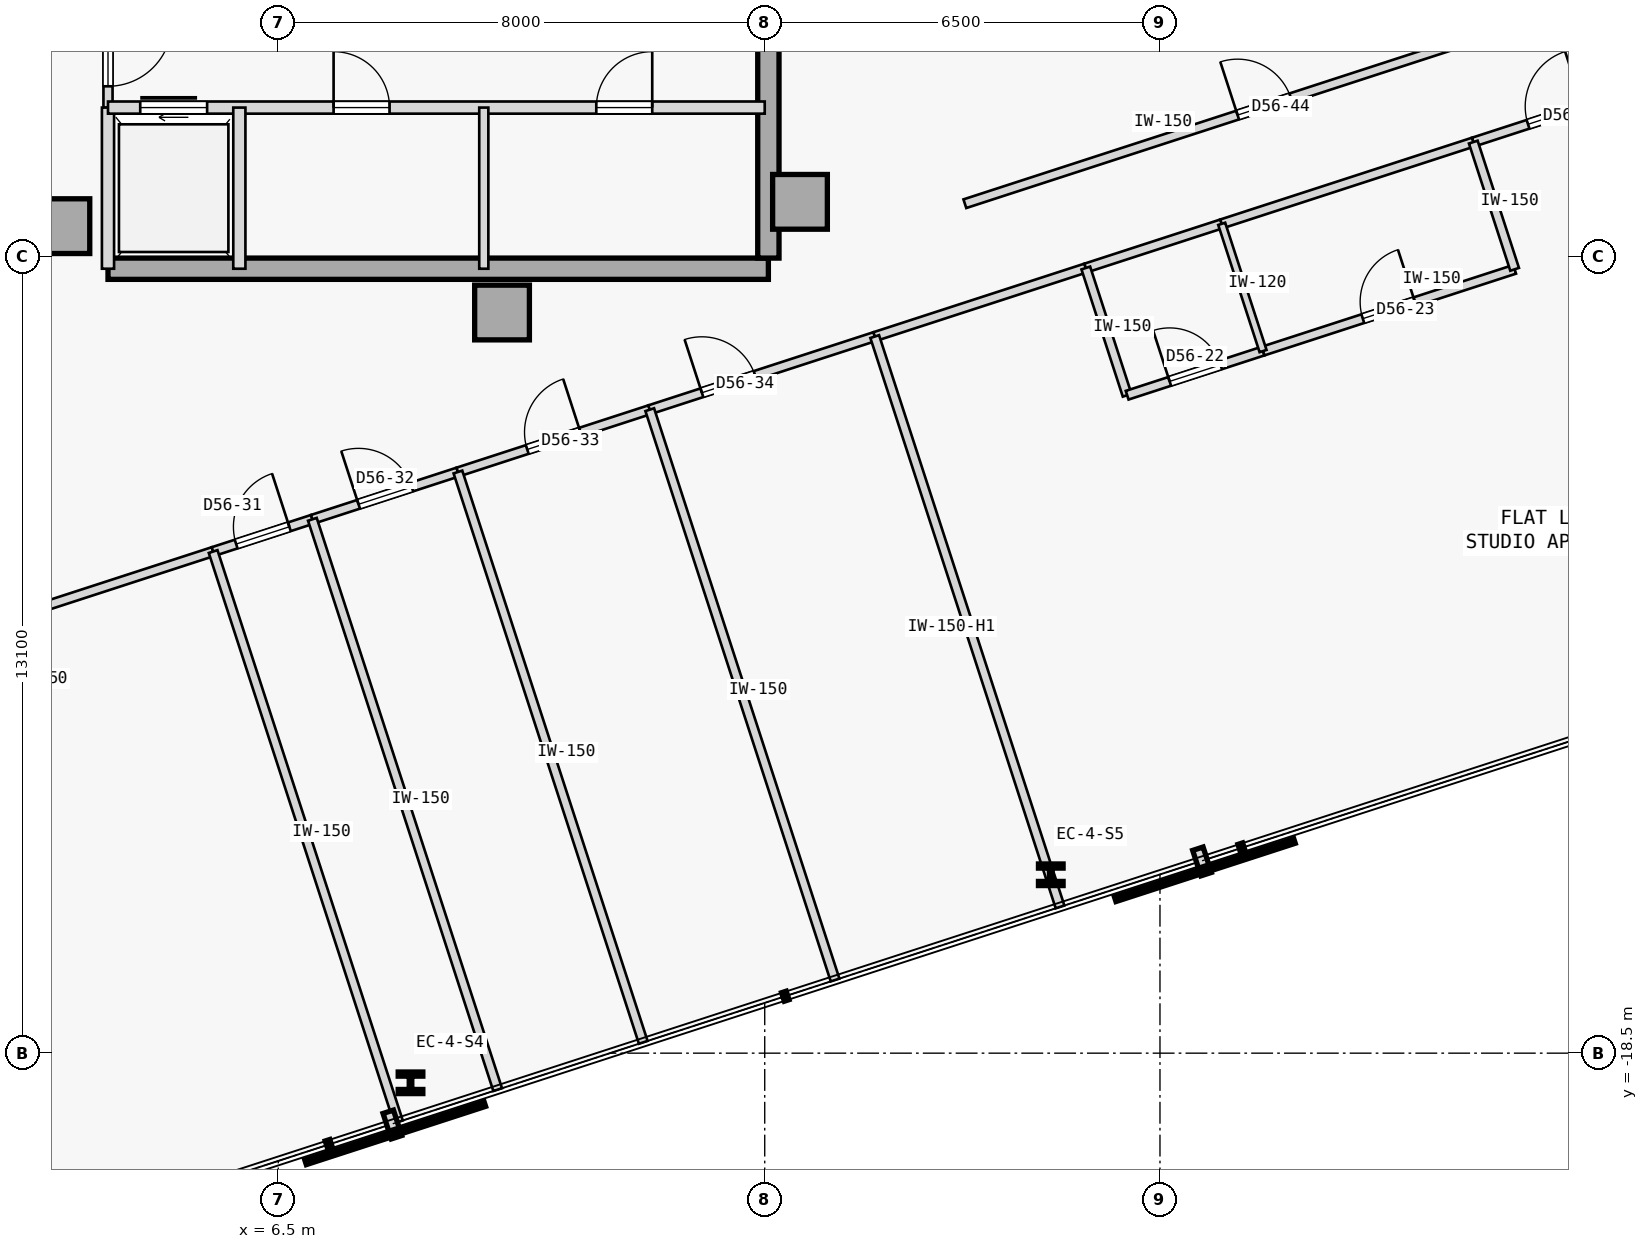
"""IFC4 building model, lengths in metres.
Left out: names, types, materials, properties, quantities, classifications, styles, units other than length and angle.
Written with IfcOpenShell. Run it as: python <this file> out.ifc"""

import sys

from ifc_helpers import new_model, si_unit, direction, frame, frame_2d, origin, origin_2d, place, context, subcontext, project, spatial, rectangle, i_section, extrude, element, fill, save


model = new_model("IFC4")
c1 = context("Model", 3, precision=1e-05, world=origin(), true_north=direction((0.0, 1.0)))
c2 = subcontext(c1, "Body", "Model", "MODEL_VIEW")
j1 = project(units=[si_unit("LENGTHUNIT", "METRE"), si_unit("PLANEANGLEUNIT", "RADIAN")], contexts=[c1])
p1 = place(None, origin())
s1 = spatial("IfcSite", under=j1, at=p1, CompositionType="ELEMENT")
p2 = place(p1, origin())
s2 = spatial("IfcBuilding", under=s1, at=p2, CompositionType="ELEMENT")
p3 = place(p2, frame((0.0, 0.0, 214.25)))
s3 = spatial("IfcBuildingStorey", under=s2, at=p3, CompositionType="ELEMENT", Elevation=214.25)
for number, where, z_axis, x_axis in (
    (1, (15.08, -4.5, 0.0), (0.0, 0.0, 1.0), (1.0, 0.0, 0.0)),
    (2, (10.18, -6.32, 0.0), (0.0, 0.0, 1.0), (1.0, 0.0, 0.0)),
    (3, (2.95, -4.9, 0.0), (0.0, 0.0, 1.0), (1.0, 0.0, 0.0)),
):
    element("IfcColumn", number, at=place(p3, frame(where, z_axis=z_axis, x_axis=x_axis)), inside=s3, PredefinedType="COLUMN", context=c2, shape_type="SweptSolid", body=[
        extrude(rectangle(XDim=0.9, YDim=0.9, at=origin_2d()), origin(), (0.0, 0.0, 1.0), 3.35),
    ])
p4 = place(p3, frame((3.7, -5.6, 0.0), z_axis=(0.0, 0.0, 1.0), x_axis=(1.0, 0.0, 0.0)))
e4 = element("IfcWall", 4, at=p4, inside=s3, PredefinedType="SHEAR", context=c2, shape_type="SweptSolid", body=[
    extrude(rectangle(XDim=10.86, YDim=0.35, at=frame_2d((5.43, 0.0))), origin(), (0.0, 0.0, 1.0), 3.125),
])
p5 = place(p3, frame((14.56, -5.425, 0.0), z_axis=(0.0, 0.0, 1.0), x_axis=(0.0, 1.0, 0.0)))
e5 = element("IfcWall", 5, at=p5, inside=s3, PredefinedType="SHEAR", context=c2, shape_type="SweptSolid", body=[
    extrude(rectangle(XDim=10.85, YDim=0.35, at=frame_2d((5.425, 0.0))), origin(), (0.0, 0.0, 1.0), 3.125),
])
for number, where, z_axis, x_axis in (
    (6, (8.675, -18.988, 0.0), (0.0, 0.0, 1.0), (1.0, 0.0, 0.0)),
    (7, (19.204, -15.566, 0.0), (0.0, 0.0, 1.0), (1.0, 0.0, 0.0)),
):
    element("IfcColumn", number, at=place(p3, frame(where, z_axis=z_axis, x_axis=x_axis)), inside=s3, PredefinedType="COLUMN", context=c2, shape_type="SweptSolid", body=[
        extrude(i_section(OverallWidth=0.405, OverallDepth=0.355, WebThickness=0.042, FlangeThickness=0.068, FilletRadius=0.015, at=origin_2d()), origin(), (0.0, 0.0, 1.0), 3.35),
    ])
p6 = place(p3, frame((3.7, -2.95, 0.0), z_axis=(0.0, 0.0, 1.0), x_axis=(0.0, 1.0, 0.0)))
e8 = element("IfcWall", 8, at=p6, inside=s3, PredefinedType="PARTITIONING", context=c2, shape_type="SweptSolid", body=[
    extrude(rectangle(XDim=1.8, YDim=0.15, at=frame_2d((0.9, 0.0))), origin(), (0.0, 0.0, 1.0), 3.125),
])
p7 = place(p6, frame((0.35, 0.0, 0.0)))
e9 = element("IfcOpeningElement", 9, at=p7, cuts=e8, PredefinedType="OPENING", context=c2, shape_type="SweptSolid", body=[
    extrude(rectangle(XDim=1.05, YDim=2.18, at=frame_2d((0.525, 1.09))), frame((0.0, 0.085, 0.0), z_axis=(0.0, -1.0, 0.0), x_axis=(1.0, 0.0, 0.0)), (0.0, 0.0, 1.0), 0.17),
])
p8 = place(p3, frame((3.7, -5.6, 0.0), z_axis=(0.0, 0.0, 1.0), x_axis=(0.0, 1.0, 0.0)))
e10 = element("IfcWall", 10, at=p8, inside=s3, PredefinedType="STANDARD", context=c2, shape_type="SweptSolid", body=[
    extrude(rectangle(XDim=2.65, YDim=0.2, at=frame_2d((1.325, 0.0))), origin(), (0.0, 0.0, 1.0), 3.125),
])
p9 = place(p3, frame((3.7, -2.95, 0.0), z_axis=(0.0, 0.0, 1.0), x_axis=(1.0, 0.0, 0.0)))
e11 = element("IfcWall", 11, at=p9, inside=s3, PredefinedType="STANDARD", context=c2, shape_type="SweptSolid", body=[
    extrude(rectangle(XDim=10.8, YDim=0.2, at=frame_2d((5.4, 0.0))), origin(), (0.0, 0.0, 1.0), 3.125),
])
p10 = place(p9, frame((0.53, 0.0, 0.0)))
e12 = element("IfcOpeningElement", 12, at=p10, cuts=e11, PredefinedType="OPENING", context=c2, shape_type="SweptSolid", body=[
    extrude(rectangle(XDim=1.1, YDim=2.15, at=frame_2d((0.55, 1.075))), frame((0.0, 0.11, 0.0), z_axis=(0.0, -1.0, 0.0), x_axis=(1.0, 0.0, 0.0)), (0.0, 0.0, 1.0), 0.22),
])
p11 = place(p9, frame((3.71, 0.0, 0.0)))
e13 = element("IfcOpeningElement", 13, at=p11, cuts=e11, PredefinedType="OPENING", context=c2, shape_type="SweptSolid", body=[
    extrude(rectangle(XDim=0.92, YDim=2.15, at=frame_2d((0.46, 1.075))), frame((0.0, 0.11, 0.0), z_axis=(0.0, -1.0, 0.0), x_axis=(1.0, 0.0, 0.0)), (0.0, 0.0, 1.0), 0.22),
])
p12 = place(p9, frame((8.03, 0.0, 0.0)))
e14 = element("IfcOpeningElement", 14, at=p12, cuts=e11, PredefinedType="OPENING", context=c2, shape_type="SweptSolid", body=[
    extrude(rectangle(XDim=0.92, YDim=2.15, at=frame_2d((0.46, 1.075))), frame((0.0, 0.11, 0.0), z_axis=(0.0, -1.0, 0.0), x_axis=(1.0, 0.0, 0.0)), (0.0, 0.0, 1.0), 0.22),
])
p13 = place(p3, frame((5.86, -5.6, 0.0), z_axis=(0.0, 0.0, 1.0), x_axis=(0.0, 1.0, 0.0)))
e15 = element("IfcWall", 15, at=p13, inside=s3, PredefinedType="STANDARD", context=c2, shape_type="SweptSolid", body=[
    extrude(rectangle(XDim=2.65, YDim=0.2, at=frame_2d((1.325, 0.0))), origin(), (0.0, 0.0, 1.0), 3.125),
])
p14 = place(p3, frame((9.88, -5.6, 0.0), z_axis=(0.0, 0.0, 1.0), x_axis=(0.0, 1.0, 0.0)))
e16 = element("IfcWall", 16, at=p14, inside=s3, PredefinedType="PARTITIONING", context=c2, shape_type="SweptSolid", body=[
    extrude(rectangle(XDim=2.65, YDim=0.15, at=frame_2d((1.325, 0.0))), origin(), (0.0, 0.0, 1.0), 3.125),
])
p15 = place(p3, frame((1.98, -11.372, 0.0), z_axis=(0.0, 0.0, 1.0), x_axis=(0.951052868128, 0.309028222052, 0.0)))
e17 = element("IfcWall", 17, at=p15, inside=s3, PredefinedType="PARTITIONING", context=c2, shape_type="SweptSolid", body=[
    extrude(rectangle(XDim=3.626, YDim=0.15, at=frame_2d((1.813, 0.0))), origin(), (0.0, 0.0, 1.0), 3.125),
])
p16 = place(p3, frame((16.309, -6.716, 0.0), z_axis=(0.0, 0.0, 1.0), x_axis=(0.951057168147, 0.309014988174, 0.0)))
e18 = element("IfcWall", 18, at=p16, inside=s3, PredefinedType="PARTITIONING", context=c2, shape_type="SweptSolid", body=[
    extrude(rectangle(XDim=3.65, YDim=0.15, at=frame_2d((1.825, 0.0))), origin(), (0.0, 0.0, 1.0), 3.125),
])
p17 = place(p3, frame((26.152, -3.518, 0.0), z_axis=(0.0, 0.0, 1.0), x_axis=(0.951048201303, 0.309042584119, 0.0)))
e19 = element("IfcWall", 19, at=p17, inside=s3, PredefinedType="PARTITIONING", context=c2, shape_type="SweptSolid", body=[
    extrude(rectangle(XDim=4.062, YDim=0.15, at=frame_2d((2.031, 0.0))), origin(), (0.0, 0.0, 1.0), 3.125),
])
p18 = place(p17, frame((0.947, 0.0, 0.0)))
e20 = element("IfcOpeningElement", 20, at=p18, cuts=e19, PredefinedType="OPENING", context=c2, shape_type="SweptSolid", body=[
    extrude(rectangle(XDim=0.95, YDim=2.15, at=frame_2d((0.475, 1.075))), frame((0.0, 0.085, 0.0), z_axis=(0.0, -1.0, 0.0), x_axis=(1.0, 0.0, 0.0)), (0.0, 0.0, 1.0), 0.17),
])
p19 = place(p3, frame((19.78, -5.588, 0.0), z_axis=(0.0, 0.0, 1.0), x_axis=(0.951076048914, 0.308956872689, 0.0)))
e21 = element("IfcWall", 21, at=p19, inside=s3, PredefinedType="PARTITIONING", context=c2, shape_type="SweptSolid", body=[
    extrude(rectangle(XDim=2.35, YDim=0.15, at=frame_2d((1.175, 0.0))), origin(), (0.0, 0.0, 1.0), 3.125),
])
p20 = place(p3, frame((22.015, -4.862, 0.0), z_axis=(0.0, 0.0, 1.0), x_axis=(0.951052627573, 0.309028962374, 0.0)))
e22 = element("IfcWall", 22, at=p20, inside=s3, PredefinedType="PARTITIONING", context=c2, shape_type="SweptSolid", body=[
    extrude(rectangle(XDim=4.35, YDim=0.15, at=frame_2d((2.175, 0.0))), origin(), (0.0, 0.0, 1.0), 3.125),
])
p21 = place(p3, frame((5.429, -10.251, 0.0), z_axis=(0.0, 0.0, 1.0), x_axis=(0.95104661559, 0.309047463953, 0.0)))
e23 = element("IfcWall", 23, at=p21, inside=s3, PredefinedType="PARTITIONING", context=c2, shape_type="SweptSolid", body=[
    extrude(rectangle(XDim=1.716, YDim=0.15, at=frame_2d((0.858, 0.0))), origin(), (0.0, 0.0, 1.0), 3.125),
])
p22 = place(p21, frame((0.398, 0.0, 0.0)))
e24 = element("IfcOpeningElement", 24, at=p22, cuts=e23, PredefinedType="OPENING", context=c2, shape_type="SweptSolid", body=[
    extrude(rectangle(XDim=0.92, YDim=2.15, at=frame_2d((0.46, 1.075))), frame((0.0, 0.085, 0.0), z_axis=(0.0, -1.0, 0.0), x_axis=(1.0, 0.0, 0.0)), (0.0, 0.0, 1.0), 0.17),
])
p23 = place(p3, frame((7.061, -9.721, 0.0), z_axis=(0.0, 0.0, 1.0), x_axis=(0.951051887333, 0.309031240494, 0.0)))
e25 = element("IfcWall", 25, at=p23, inside=s3, PredefinedType="PARTITIONING", context=c2, shape_type="SweptSolid", body=[
    extrude(rectangle(XDim=2.517, YDim=0.15, at=frame_2d((1.259, 0.0))), origin(), (0.0, 0.0, 1.0), 3.125),
])
p24 = place(p23, frame((0.799, 0.0, 0.0)))
e26 = element("IfcOpeningElement", 26, at=p24, cuts=e25, PredefinedType="OPENING", context=c2, shape_type="SweptSolid", body=[
    extrude(rectangle(XDim=0.92, YDim=2.15, at=frame_2d((0.46, 1.075))), frame((0.0, 0.085, 0.0), z_axis=(0.0, -1.0, 0.0), x_axis=(1.0, 0.0, 0.0)), (0.0, 0.0, 1.0), 0.17),
])
p25 = place(p3, frame((9.455, -8.943, 0.0), z_axis=(0.0, 0.0, 1.0), x_axis=(0.951069760241, 0.30897623073, 0.0)))
e27 = element("IfcWall", 27, at=p25, inside=s3, PredefinedType="PARTITIONING", context=c2, shape_type="SweptSolid", body=[
    extrude(rectangle(XDim=3.317, YDim=0.15, at=frame_2d((1.659, 0.0))), origin(), (0.0, 0.0, 1.0), 3.125),
])
p26 = place(p25, frame((1.198, 0.0, 0.0)))
e28 = element("IfcOpeningElement", 28, at=p26, cuts=e27, PredefinedType="OPENING", context=c2, shape_type="SweptSolid", body=[
    extrude(rectangle(XDim=0.92, YDim=2.15, at=frame_2d((0.46, 1.075))), frame((0.0, 0.085, 0.0), z_axis=(0.0, -1.0, 0.0), x_axis=(1.0, 0.0, 0.0)), (0.0, 0.0, 1.0), 0.17),
])
p27 = place(p3, frame((12.609, -7.918, 0.0), z_axis=(0.0, 0.0, 1.0), x_axis=(0.951047443558, 0.309044915995, 0.0)))
e29 = element("IfcWall", 29, at=p27, inside=s3, PredefinedType="PARTITIONING", context=c2, shape_type="SweptSolid", body=[
    extrude(rectangle(XDim=3.89, YDim=0.15, at=frame_2d((1.945, 0.0))), origin(), (0.0, 0.0, 1.0), 3.125),
])
p28 = place(p27, frame((0.902, 0.0, 0.0)))
e30 = element("IfcOpeningElement", 30, at=p28, cuts=e29, PredefinedType="OPENING", context=c2, shape_type="SweptSolid", body=[
    extrude(rectangle(XDim=0.92, YDim=2.15, at=frame_2d((0.46, 1.075))), frame((0.0, 0.085, 0.0), z_axis=(0.0, -1.0, 0.0), x_axis=(1.0, 0.0, 0.0)), (0.0, 0.0, 1.0), 0.17),
])
p29 = place(p3, frame((17.791, -4.531, 0.0), z_axis=(0.0, 0.0, 1.0), x_axis=(0.951056769902, 0.309016213852, 0.0)))
e31 = element("IfcWall", 31, at=p29, inside=s3, PredefinedType="PARTITIONING", context=c2, shape_type="SweptSolid", body=[
    extrude(rectangle(XDim=10.352, YDim=0.15, at=frame_2d((5.176, 0.0))), origin(), (0.0, 0.0, 1.0), 3.125),
])
p30 = place(p29, frame((4.716, 0.0, 0.0)))
e32 = element("IfcOpeningElement", 32, at=p30, cuts=e31, PredefinedType="OPENING", context=c2, shape_type="SweptSolid", body=[
    extrude(rectangle(XDim=0.92, YDim=2.15, at=frame_2d((0.46, 1.075))), frame((0.0, 0.085, 0.0), z_axis=(0.0, -1.0, 0.0), x_axis=(1.0, 0.0, 0.0)), (0.0, 0.0, 1.0), 0.17),
])
p31 = place(p3, frame((8.476, -19.63, 0.0), z_axis=(0.0, 0.0, 1.0), x_axis=(-0.308999867152, 0.951062081097, 0.0)))
e33 = element("IfcWall", 33, at=p31, inside=s3, PredefinedType="PARTITIONING", context=c2, shape_type="SweptSolid", body=[
    extrude(rectangle(XDim=9.862, YDim=0.15, at=frame_2d((4.931, 0.0))), origin(), (0.0, 0.0, 1.0), 3.125),
])
p32 = place(p3, frame((20.46, -7.68, 0.0), z_axis=(0.0, 0.0, 1.0), x_axis=(-0.309060979314, 0.951042223598, 0.0)))
e34 = element("IfcWall", 34, at=p32, inside=s3, PredefinedType="PARTITIONING", context=c2, shape_type="SweptSolid", body=[
    extrude(rectangle(XDim=2.2, YDim=0.15, at=frame_2d((1.1, 0.0))), origin(), (0.0, 0.0, 1.0), 3.125),
])
p33 = place(p3, frame((20.46, -7.68, 0.0), z_axis=(0.0, 0.0, 1.0), x_axis=(0.951066131077, 0.308987401554, 0.0)))
e35 = element("IfcWall", 35, at=p33, inside=s3, PredefinedType="PARTITIONING", context=c2, shape_type="SweptSolid", body=[
    extrude(rectangle(XDim=2.35, YDim=0.15, at=frame_2d((1.175, 0.0))), origin(), (0.0, 0.0, 1.0), 3.125),
])
p34 = place(p33, frame((0.735, 0.0, 0.0)))
e36 = element("IfcOpeningElement", 36, at=p34, cuts=e35, PredefinedType="OPENING", context=c2, shape_type="SweptSolid", body=[
    extrude(rectangle(XDim=0.88, YDim=2.15, at=frame_2d((0.44, 1.075))), frame((0.0, 0.085, 0.0), z_axis=(0.0, -1.0, 0.0), x_axis=(1.0, 0.0, 0.0)), (0.0, 0.0, 1.0), 0.17),
])
p35 = place(p3, frame((22.695, -6.954, 0.0), z_axis=(0.0, 0.0, 1.0), x_axis=(0.951057987102, 0.309012467661, 0.0)))
e37 = element("IfcWall", 37, at=p35, inside=s3, PredefinedType="PARTITIONING", context=c2, shape_type="SweptSolid", body=[
    extrude(rectangle(XDim=4.35, YDim=0.15, at=frame_2d((2.175, 0.0))), origin(), (0.0, 0.0, 1.0), 3.125),
])
p36 = place(p35, frame((1.725, 0.0, 0.0)))
e38 = element("IfcOpeningElement", 38, at=p36, cuts=e37, PredefinedType="OPENING", context=c2, shape_type="SweptSolid", body=[
    extrude(rectangle(XDim=0.9, YDim=2.15, at=frame_2d((0.45, 1.075))), frame((0.0, 0.085, 0.0), z_axis=(0.0, -1.0, 0.0), x_axis=(1.0, 0.0, 0.0)), (0.0, 0.0, 1.0), 0.17),
])
p37 = place(p3, frame((26.832, -5.61, 0.0), z_axis=(0.0, 0.0, 1.0), x_axis=(-0.309060979314, 0.951042223598, 0.0)))
e39 = element("IfcWall", 39, at=p37, inside=s3, PredefinedType="PARTITIONING", context=c2, shape_type="SweptSolid", body=[
    extrude(rectangle(XDim=2.2, YDim=0.15, at=frame_2d((1.1, 0.0))), origin(), (0.0, 0.0, 1.0), 3.125),
])
p38 = place(p3, frame((19.356, -16.095, 0.0), z_axis=(0.0, 0.0, 1.0), x_axis=(-0.309022258842, 0.95105480575, 0.0)))
e40 = element("IfcWall", 40, at=p38, inside=s3, PredefinedType="PARTITIONING", context=c2, shape_type="SweptSolid", body=[
    extrude(rectangle(XDim=9.862, YDim=0.15, at=frame_2d((4.931, 0.0))), origin(), (0.0, 0.0, 1.0), 2.675),
])
p39 = place(p3, frame((22.695, -6.954, 0.0), z_axis=(0.0, 0.0, 1.0), x_axis=(-0.308960600764, 0.951074837842, 0.0)))
e41 = element("IfcWall", 41, at=p39, inside=s3, PredefinedType="PARTITIONING", context=c2, shape_type="SweptSolid", body=[
    extrude(rectangle(XDim=2.2, YDim=0.12, at=frame_2d((1.1, 0.0))), origin(), (0.0, 0.0, 1.0), 3.125),
])
for number, where, z_axis, x_axis in (
    (42, (10.108, -19.1, 0.0), (0.0, 0.0, 1.0), (-0.309, 0.951, 0.0)),
    (43, (12.502, -18.322, 0.0), (0.0, 0.0, 1.0), (-0.309, 0.951, 0.0)),
):
    element("IfcWall", number, at=place(p3, frame(where, z_axis=z_axis, x_axis=x_axis)), inside=s3, PredefinedType="PARTITIONING", context=c2, shape_type="SweptSolid", body=[
        extrude(rectangle(XDim=9.862, YDim=0.15, at=frame_2d((4.931, 0.0))), origin(), (0.0, 0.0, 1.0), 3.125),
    ])
p40 = place(p3, frame((15.657, -17.297, 0.0), z_axis=(0.0, 0.0, 1.0), x_axis=(-0.309029534558, 0.951052441651, 0.0)))
e44 = element("IfcWall", 44, at=p40, inside=s3, PredefinedType="PARTITIONING", context=c2, shape_type="SweptSolid", body=[
    extrude(rectangle(XDim=9.862, YDim=0.15, at=frame_2d((4.931, 0.0))), origin(), (0.0, 0.0, 1.0), 3.125),
])
p41 = place(p7, frame((1.05, 0.0, 0.0), z_axis=(0.0, 0.0, 1.0), x_axis=(-1.0, 0.0, 0.0)))
e45 = element("IfcDoor", 45, at=p41, inside=s3, OperationType="SINGLE_SWING_RIGHT", PredefinedType="DOOR", context=c2, shape_type="SweptSolid", body=[
    extrude(rectangle(XDim=1.05, YDim=2.18, at=frame_2d((0.525, 1.09))), frame((0.0, 0.025, 0.0), z_axis=(0.0, -1.0, 0.0), x_axis=(1.0, 0.0, 0.0)), (0.0, 0.0, 1.0), 0.05),
])
fill(e9, e45)
p42 = place(p10, origin())
e46 = element("IfcDoor", 46, at=p42, inside=s3, OperationType="SLIDING_TO_RIGHT", PredefinedType="DOOR", context=c2, shape_type="SweptSolid", body=[
    extrude(rectangle(XDim=1.1, YDim=2.15, at=frame_2d((0.55, 1.075))), frame((0.0, 0.025, 0.0), z_axis=(0.0, -1.0, 0.0), x_axis=(1.0, 0.0, 0.0)), (0.0, 0.0, 1.0), 0.05),
])
fill(e12, e46)
p43 = place(p11, origin())
e47 = element("IfcDoor", 47, at=p43, inside=s3, OperationType="SINGLE_SWING_LEFT", PredefinedType="DOOR", context=c2, shape_type="SweptSolid", body=[
    extrude(rectangle(XDim=0.92, YDim=2.15, at=frame_2d((0.46, 1.075))), frame((0.0, 0.025, 0.0), z_axis=(0.0, -1.0, 0.0), x_axis=(1.0, 0.0, 0.0)), (0.0, 0.0, 1.0), 0.05),
])
fill(e13, e47)
p44 = place(p12, origin())
e48 = element("IfcDoor", 48, at=p44, inside=s3, OperationType="SINGLE_SWING_RIGHT", PredefinedType="DOOR", context=c2, shape_type="SweptSolid", body=[
    extrude(rectangle(XDim=0.92, YDim=2.15, at=frame_2d((0.46, 1.075))), frame((0.0, 0.025, 0.0), z_axis=(0.0, -1.0, 0.0), x_axis=(1.0, 0.0, 0.0)), (0.0, 0.0, 1.0), 0.05),
])
fill(e14, e48)
p45 = place(p18, origin())
e49 = element("IfcDoor", 49, at=p45, inside=s3, OperationType="SINGLE_SWING_RIGHT", PredefinedType="DOOR", context=c2, shape_type="SweptSolid", body=[
    extrude(rectangle(XDim=0.95, YDim=2.15, at=frame_2d((0.475, 1.075))), frame((0.0, 0.025, 0.0), z_axis=(0.0, -1.0, 0.0), x_axis=(1.0, 0.0, 0.0)), (0.0, 0.0, 1.0), 0.05),
])
fill(e20, e49)
p46 = place(p34, origin())
e50 = element("IfcDoor", 50, at=p46, inside=s3, OperationType="SINGLE_SWING_LEFT", PredefinedType="DOOR", context=c2, shape_type="SweptSolid", body=[
    extrude(rectangle(XDim=0.88, YDim=2.15, at=frame_2d((0.44, 1.075))), frame((0.0, 0.025, 0.0), z_axis=(0.0, -1.0, 0.0), x_axis=(1.0, 0.0, 0.0)), (0.0, 0.0, 1.0), 0.05),
])
fill(e36, e50)
p47 = place(p36, origin())
e51 = element("IfcDoor", 51, at=p47, inside=s3, OperationType="SINGLE_SWING_RIGHT", PredefinedType="DOOR", context=c2, shape_type="SweptSolid", body=[
    extrude(rectangle(XDim=0.9, YDim=2.15, at=frame_2d((0.45, 1.075))), frame((0.0, 0.025, 0.0), z_axis=(0.0, -1.0, 0.0), x_axis=(1.0, 0.0, 0.0)), (0.0, 0.0, 1.0), 0.05),
])
fill(e38, e51)
p48 = place(p22, origin())
e52 = element("IfcDoor", 52, at=p48, inside=s3, OperationType="SINGLE_SWING_RIGHT", PredefinedType="DOOR", context=c2, shape_type="SweptSolid", body=[
    extrude(rectangle(XDim=0.92, YDim=2.15, at=frame_2d((0.46, 1.075))), frame((0.0, 0.025, 0.0), z_axis=(0.0, -1.0, 0.0), x_axis=(1.0, 0.0, 0.0)), (0.0, 0.0, 1.0), 0.05),
])
fill(e24, e52)
p49 = place(p24, origin())
e53 = element("IfcDoor", 53, at=p49, inside=s3, OperationType="SINGLE_SWING_LEFT", PredefinedType="DOOR", context=c2, shape_type="SweptSolid", body=[
    extrude(rectangle(XDim=0.92, YDim=2.15, at=frame_2d((0.46, 1.075))), frame((0.0, 0.025, 0.0), z_axis=(0.0, -1.0, 0.0), x_axis=(1.0, 0.0, 0.0)), (0.0, 0.0, 1.0), 0.05),
])
fill(e26, e53)
p50 = place(p26, origin())
e54 = element("IfcDoor", 54, at=p50, inside=s3, OperationType="SINGLE_SWING_RIGHT", PredefinedType="DOOR", context=c2, shape_type="SweptSolid", body=[
    extrude(rectangle(XDim=0.92, YDim=2.15, at=frame_2d((0.46, 1.075))), frame((0.0, 0.025, 0.0), z_axis=(0.0, -1.0, 0.0), x_axis=(1.0, 0.0, 0.0)), (0.0, 0.0, 1.0), 0.05),
])
fill(e28, e54)
p51 = place(p28, origin())
e55 = element("IfcDoor", 55, at=p51, inside=s3, OperationType="SINGLE_SWING_LEFT", PredefinedType="DOOR", context=c2, shape_type="SweptSolid", body=[
    extrude(rectangle(XDim=0.92, YDim=2.15, at=frame_2d((0.46, 1.075))), frame((0.0, 0.025, 0.0), z_axis=(0.0, -1.0, 0.0), x_axis=(1.0, 0.0, 0.0)), (0.0, 0.0, 1.0), 0.05),
])
fill(e30, e55)
p52 = place(p30, origin())
e56 = element("IfcDoor", 56, at=p52, inside=s3, OperationType="SINGLE_SWING_LEFT", PredefinedType="DOOR", context=c2, shape_type="SweptSolid", body=[
    extrude(rectangle(XDim=0.92, YDim=2.15, at=frame_2d((0.46, 1.075))), frame((0.0, 0.025, 0.0), z_axis=(0.0, -1.0, 0.0), x_axis=(1.0, 0.0, 0.0)), (0.0, 0.0, 1.0), 0.05),
])
fill(e32, e56)
save(model, sys.argv[1])
